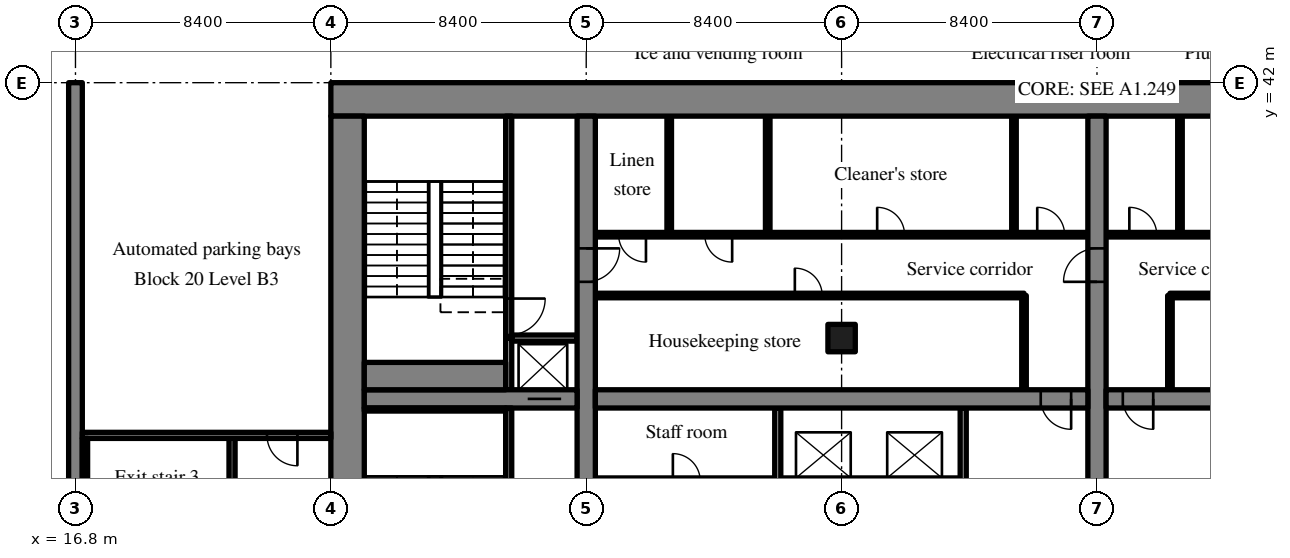
"""IFC4 building model, lengths in metres.
Left out: names, types, materials, properties, quantities, classifications, styles, units other than length and angle.
Written with IfcOpenShell. Run it as: python <this file> out.ifc"""

import sys

from ifc_helpers import new_model, si_unit, direction, frame, frame_2d, origin, origin_2d, place, context, subcontext, project, spatial, rectangle, extrude, source, transform, mapped, element, fill, save


model = new_model("IFC4")
c1 = context("Model", 3, precision=1e-05, world=origin(), true_north=direction((0.0, 1.0)))
c2 = subcontext(c1, "Body", "Model", "MODEL_VIEW")
j1 = project(units=[si_unit("LENGTHUNIT", "METRE"), si_unit("PLANEANGLEUNIT", "RADIAN")], contexts=[c1])
p1 = place(None, origin())
s1 = spatial("IfcSite", under=j1, at=p1, CompositionType="ELEMENT")
p2 = place(p1, origin())
s2 = spatial("IfcBuilding", under=s1, at=p2, CompositionType="ELEMENT")
p3 = place(p2, frame((0.0, 0.0, -13.5)))
s3 = spatial("IfcBuildingStorey", under=s2, at=p3, CompositionType="ELEMENT", Elevation=-13.5)
m1 = source(origin(), c2, "Body", "SweptSolid", [
    extrude(rectangle(XDim=50.4, YDim=1.1, at=frame_2d((25.2, 0.0))), origin(), (0.0, 0.0, 1.0), 4.52),
])
p4 = place(p3, frame((25.2, 41.45, -0.3), z_axis=(0.0, 0.0, 1.0), x_axis=(1.0, 0.0, 0.0)))
e1 = element("IfcWall", 1, at=p4, inside=s3, PredefinedType="SHEAR", context=c2, shape_type="MappedRepresentation", body=[
    mapped(m1, transform((0.0, 0.0, 0.0), scale=1.0)),
])
m2 = source(origin(), c2, "Body", "SweptSolid", [
    extrude(rectangle(XDim=17.8, YDim=1.1, at=frame_2d((8.9, 0.0))), origin(), (0.0, 0.0, 1.0), 4.52),
])
p5 = place(p3, frame((25.75, 23.1, -0.3), z_axis=(0.0, 0.0, 1.0), x_axis=(0.0, 1.0, 0.0)))
e2 = element("IfcWall", 2, at=p5, inside=s3, PredefinedType="SHEAR", context=c2, shape_type="MappedRepresentation", body=[
    mapped(m2, transform((0.0, 0.0, 0.0), scale=1.0)),
])
m3 = source(origin(), c2, "Body", "SweptSolid", [
    extrude(rectangle(XDim=17.8, YDim=0.6, at=frame_2d((8.9, 0.0))), origin(), (0.0, 0.0, 1.0), 4.52),
])
p6 = place(p3, frame((33.6, 23.1, -0.3), z_axis=(0.0, 0.0, 1.0), x_axis=(0.0, 1.0, 0.0)))
e3 = element("IfcWall", 3, at=p6, inside=s3, PredefinedType="SHEAR", context=c2, shape_type="MappedRepresentation", body=[
    mapped(m3, transform((0.0, 0.0, 0.0), scale=1.0)),
])
m4 = source(origin(), c2, "Body", "SweptSolid", [
    extrude(rectangle(XDim=1.1, YDim=2.1, at=frame_2d((0.55, 1.05))), frame((0.0, 0.31, 0.0), z_axis=(0.0, -1.0, 0.0), x_axis=(1.0, 0.0, 0.0)), (0.0, 0.0, 1.0), 0.62),
])
p7 = place(p6, frame((12.35, 0.0, 0.0)))
e4 = element("IfcOpeningElement", 4, at=p7, cuts=e3, PredefinedType="OPENING", context=c2, shape_type="MappedRepresentation", body=[
    mapped(m4, transform((0.0, 0.0, 0.0), scale=1.0)),
])
p8 = place(p3, frame((50.4, 23.1, -0.3), z_axis=(0.0, 0.0, 1.0), x_axis=(0.0, 1.0, 0.0)))
e5 = element("IfcWall", 5, at=p8, inside=s3, PredefinedType="SHEAR", context=c2, shape_type="MappedRepresentation", body=[
    mapped(m3, transform((0.0, 0.0, 0.0), scale=1.0)),
])
p9 = place(p8, frame((12.35, 0.0, 0.0)))
e6 = element("IfcOpeningElement", 6, at=p9, cuts=e5, PredefinedType="OPENING", context=c2, shape_type="MappedRepresentation", body=[
    mapped(m4, transform((0.0, 0.0, 0.0), scale=1.0)),
])
m5 = source(origin(), c2, "Body", "SweptSolid", [
    extrude(rectangle(XDim=7.0, YDim=0.6, at=frame_2d((3.5, 0.0))), origin(), (0.0, 0.0, 1.0), 4.52),
])
p10 = place(p3, frame((26.3, 31.6, -0.3), z_axis=(0.0, 0.0, 1.0), x_axis=(1.0, 0.0, 0.0)))
e7 = element("IfcWall", 7, at=p10, inside=s3, PredefinedType="SHEAR", context=c2, shape_type="MappedRepresentation", body=[
    mapped(m5, transform((0.0, 0.0, 0.0), scale=1.0)),
])
p11 = place(p10, frame((5.375, 0.0, 0.0)))
e8 = element("IfcOpeningElement", 8, at=p11, cuts=e7, PredefinedType="OPENING", context=c2, shape_type="MappedRepresentation", body=[
    mapped(m4, transform((0.0, 0.0, 0.0), scale=1.0)),
])
m6 = source(origin(), c2, "Body", "SweptSolid", [
    extrude(rectangle(XDim=16.2, YDim=0.6, at=frame_2d((8.1, 0.0))), origin(), (0.0, 0.0, 1.0), 4.52),
])
p12 = place(p3, frame((33.9, 31.6, -0.3), z_axis=(0.0, 0.0, 1.0), x_axis=(1.0, 0.0, 0.0)))
e9 = element("IfcWall", 9, at=p12, inside=s3, PredefinedType="SHEAR", context=c2, shape_type="MappedRepresentation", body=[
    mapped(m6, transform((0.0, 0.0, 0.0), scale=1.0)),
])
m7 = source(origin(), c2, "Body", "SweptSolid", [
    extrude(rectangle(XDim=1.0, YDim=2.1, at=frame_2d((0.5, 1.05))), frame((0.0, 0.31, 0.0), z_axis=(0.0, -1.0, 0.0), x_axis=(1.0, 0.0, 0.0)), (0.0, 0.0, 1.0), 0.62),
])
p13 = place(p12, frame((14.65, 0.0, 0.0)))
e10 = element("IfcOpeningElement", 10, at=p13, cuts=e9, PredefinedType="OPENING", context=c2, shape_type="MappedRepresentation", body=[
    mapped(m7, transform((0.0, 0.0, 0.0), scale=1.0)),
])
m8 = source(origin(), c2, "Body", "SweptSolid", [
    extrude(rectangle(XDim=16.2, YDim=0.6, at=frame_2d((8.1, 0.0))), origin(), (0.0, 0.0, 1.0), 4.52),
])
p14 = place(p3, frame((50.7, 31.6, -0.3), z_axis=(0.0, 0.0, 1.0), x_axis=(1.0, 0.0, 0.0)))
e11 = element("IfcWall", 11, at=p14, inside=s3, PredefinedType="SHEAR", context=c2, shape_type="MappedRepresentation", body=[
    mapped(m8, transform((0.0, 0.0, 0.0), scale=1.0)),
])
p15 = place(p14, frame((0.55, 0.0, 0.0)))
e12 = element("IfcOpeningElement", 12, at=p15, cuts=e11, PredefinedType="OPENING", context=c2, shape_type="MappedRepresentation", body=[
    mapped(m7, transform((0.0, 0.0, 0.0), scale=1.0)),
])
m9 = source(origin(), c2, "Body", "SweptSolid", [
    extrude(rectangle(XDim=20.0, YDim=0.45, at=frame_2d((10.0, 0.0))), origin(), (0.0, 0.0, 1.0), 4.52),
])
p16 = place(p3, frame((16.8, 22.0, -0.3), z_axis=(0.0, 0.0, 1.0), x_axis=(0.0, 1.0, 0.0)))
e13 = element("IfcWall", 13, at=p16, inside=s3, PredefinedType="SHEAR", context=c2, shape_type="MappedRepresentation", body=[
    mapped(m9, transform((0.0, 0.0, 0.0), scale=1.0)),
])
m10 = source(origin(), c2, "Body", "SweptSolid", [
    extrude(rectangle(XDim=0.9, YDim=0.9, at=origin_2d()), origin(), (0.0, 0.0, 1.0), 4.52),
])
p17 = place(p3, frame((42.0, 33.6, -0.3), z_axis=(0.0, 0.0, 1.0), x_axis=(1.0, 0.0, 0.0)))
e14 = element("IfcColumn", 14, at=p17, inside=s3, PredefinedType="COLUMN", context=c2, shape_type="MappedRepresentation", body=[
    mapped(m10, transform((0.0, 0.0, 0.0), scale=1.0)),
])
m11 = source(origin(), c2, "Body", "SweptSolid", [
    extrude(rectangle(XDim=2.5, YDim=0.2, at=frame_2d((1.25, 0.0))), origin(), (0.0, 0.0, 1.0), 4.22),
])
p18 = place(p3, frame((46.0, 28.8, 0.0), z_axis=(0.0, 0.0, 1.0), x_axis=(0.0, 1.0, 0.0)))
e15 = element("IfcWall", 15, at=p18, inside=s3, PredefinedType="SOLIDWALL", context=c2, shape_type="MappedRepresentation", body=[
    mapped(m11, transform((0.0, 0.0, 0.0), scale=1.0)),
])
m12 = source(origin(), c2, "Body", "SweptSolid", [
    extrude(rectangle(XDim=2.4, YDim=0.2, at=frame_2d((1.2, 0.0))), origin(), (0.0, 0.0, 1.0), 4.22),
])
p19 = place(p3, frame((39.9, 28.9, 0.0), z_axis=(0.0, 0.0, 1.0), x_axis=(0.0, 1.0, 0.0)))
e16 = element("IfcWall", 16, at=p19, inside=s3, PredefinedType="PARTITIONING", context=c2, shape_type="MappedRepresentation", body=[
    mapped(m12, transform((0.0, 0.0, 0.0), scale=1.0)),
])
m13 = source(origin(), c2, "Body", "SweptSolid", [
    extrude(rectangle(XDim=3.1, YDim=0.15, at=frame_2d((1.55, 0.0))), origin(), (0.0, 0.0, 1.0), 4.22),
])
p20 = place(p3, frame((48.0, 31.9, 0.0), z_axis=(0.0, 0.0, 1.0), x_axis=(0.0, 1.0, 0.0)))
e17 = element("IfcWall", 17, at=p20, inside=s3, PredefinedType="PARTITIONING", context=c2, shape_type="MappedRepresentation", body=[
    mapped(m13, transform((0.0, 0.0, 0.0), scale=1.0)),
])
m14 = source(origin(), c2, "Body", "SweptSolid", [
    extrude(rectangle(XDim=14.1, YDim=0.15, at=frame_2d((7.05, 0.0))), origin(), (0.0, 0.0, 1.0), 4.22),
])
p21 = place(p3, frame((33.9, 35.0, 0.0), z_axis=(0.0, 0.0, 1.0), x_axis=(1.0, 0.0, 0.0)))
e18 = element("IfcWall", 18, at=p21, inside=s3, PredefinedType="PARTITIONING", context=c2, shape_type="MappedRepresentation", body=[
    mapped(m14, transform((0.0, 0.0, 0.0), scale=1.0)),
])
m15 = source(origin(), c2, "Body", "SweptSolid", [
    extrude(rectangle(XDim=0.9, YDim=2.1, at=frame_2d((0.45, 1.05))), frame((0.0, 0.085, 0.0), z_axis=(0.0, -1.0, 0.0), x_axis=(1.0, 0.0, 0.0)), (0.0, 0.0, 1.0), 0.17),
])
p22 = place(p21, frame((6.562, 0.0, 0.0)))
e19 = element("IfcOpeningElement", 19, at=p22, cuts=e18, PredefinedType="OPENING", context=c2, shape_type="MappedRepresentation", body=[
    mapped(m15, transform((0.0, 0.0, 0.0), scale=1.0)),
])
m16 = source(origin(), c2, "Body", "SweptSolid", [
    extrude(rectangle(XDim=16.2, YDim=0.15, at=frame_2d((8.1, 0.0))), origin(), (0.0, 0.0, 1.0), 4.22),
])
p23 = place(p3, frame((33.9, 37.0, 0.0), z_axis=(0.0, 0.0, 1.0), x_axis=(1.0, 0.0, 0.0)))
e20 = element("IfcWall", 20, at=p23, inside=s3, PredefinedType="PARTITIONING", context=c2, shape_type="MappedRepresentation", body=[
    mapped(m16, transform((0.0, 0.0, 0.0), scale=1.0)),
])
p24 = place(p23, frame((0.765, 0.0, 0.0)))
e21 = element("IfcOpeningElement", 21, at=p24, cuts=e20, PredefinedType="OPENING", context=c2, shape_type="MappedRepresentation", body=[
    mapped(m15, transform((0.0, 0.0, 0.0), scale=1.0)),
])
p25 = place(p23, frame((3.6, 0.0, 0.0)))
e22 = element("IfcOpeningElement", 22, at=p25, cuts=e20, PredefinedType="OPENING", context=c2, shape_type="MappedRepresentation", body=[
    mapped(m15, transform((0.0, 0.0, 0.0), scale=1.0)),
])
p26 = place(p23, frame((9.27, 0.0, 0.0)))
e23 = element("IfcOpeningElement", 23, at=p26, cuts=e20, PredefinedType="OPENING", context=c2, shape_type="MappedRepresentation", body=[
    mapped(m15, transform((0.0, 0.0, 0.0), scale=1.0)),
])
p27 = place(p23, frame((14.535, 0.0, 0.0)))
e24 = element("IfcOpeningElement", 24, at=p27, cuts=e20, PredefinedType="OPENING", context=c2, shape_type="MappedRepresentation", body=[
    mapped(m15, transform((0.0, 0.0, 0.0), scale=1.0)),
])
m17 = source(origin(), c2, "Body", "SweptSolid", [
    extrude(rectangle(XDim=3.9, YDim=0.15, at=frame_2d((1.95, 0.0))), origin(), (0.0, 0.0, 1.0), 4.22),
])
for number, where, z_axis, x_axis in (
    (25, (36.33, 37.0, 0.0), (0.0, 0.0, 1.0), (0.0, 1.0, 0.0)),
    (26, (39.57, 37.0, 0.0), (0.0, 0.0, 1.0), (0.0, 1.0, 0.0)),
    (27, (47.67, 37.0, 0.0), (0.0, 0.0, 1.0), (0.0, 1.0, 0.0)),
):
    element("IfcWall", number, at=place(p3, frame(where, z_axis=z_axis, x_axis=x_axis)), inside=s3, PredefinedType="PARTITIONING", context=c2, shape_type="MappedRepresentation", body=[
        mapped(m17, transform((0.0, 0.0, 0.0), scale=1.0)),
    ])
p28 = place(p3, frame((52.8, 31.9, 0.0), z_axis=(0.0, 0.0, 1.0), x_axis=(0.0, 1.0, 0.0)))
e28 = element("IfcWall", 28, at=p28, inside=s3, PredefinedType="PARTITIONING", context=c2, shape_type="MappedRepresentation", body=[
    mapped(m13, transform((0.0, 0.0, 0.0), scale=1.0)),
])
m18 = source(origin(), c2, "Body", "SweptSolid", [
    extrude(rectangle(XDim=14.1, YDim=0.15, at=frame_2d((7.05, 0.0))), origin(), (0.0, 0.0, 1.0), 4.22),
])
p29 = place(p3, frame((66.9, 35.0, 0.0), z_axis=(0.0, 0.0, 1.0), x_axis=(-1.0, 0.0, 0.0)))
e29 = element("IfcWall", 29, at=p29, inside=s3, PredefinedType="PARTITIONING", context=c2, shape_type="MappedRepresentation", body=[
    mapped(m18, transform((0.0, 0.0, 0.0), scale=1.0)),
])
p30 = place(p29, frame((3.407, 0.0, 0.0)))
e30 = element("IfcOpeningElement", 30, at=p30, cuts=e29, PredefinedType="OPENING", context=c2, shape_type="MappedRepresentation", body=[
    mapped(m15, transform((0.0, 0.0, 0.0), scale=1.0)),
])
p31 = place(p29, frame((10.419, 0.0, 0.0)))
e31 = element("IfcOpeningElement", 31, at=p31, cuts=e29, PredefinedType="OPENING", context=c2, shape_type="MappedRepresentation", body=[
    mapped(m15, transform((0.0, 0.0, 0.0), scale=1.0)),
])
m19 = source(origin(), c2, "Body", "SweptSolid", [
    extrude(rectangle(XDim=16.2, YDim=0.15, at=frame_2d((8.1, 0.0))), origin(), (0.0, 0.0, 1.0), 4.22),
])
p32 = place(p3, frame((66.9, 37.0, 0.0), z_axis=(0.0, 0.0, 1.0), x_axis=(-1.0, 0.0, 0.0)))
e32 = element("IfcWall", 32, at=p32, inside=s3, PredefinedType="PARTITIONING", context=c2, shape_type="MappedRepresentation", body=[
    mapped(m19, transform((0.0, 0.0, 0.0), scale=1.0)),
])
p33 = place(p32, frame((6.435, 0.0, 0.0)))
e33 = element("IfcOpeningElement", 33, at=p33, cuts=e32, PredefinedType="OPENING", context=c2, shape_type="MappedRepresentation", body=[
    mapped(m15, transform((0.0, 0.0, 0.0), scale=1.0)),
])
p34 = place(p32, frame((14.535, 0.0, 0.0)))
e34 = element("IfcOpeningElement", 34, at=p34, cuts=e32, PredefinedType="OPENING", context=c2, shape_type="MappedRepresentation", body=[
    mapped(m15, transform((0.0, 0.0, 0.0), scale=1.0)),
])
p35 = place(p3, frame((53.13, 37.0, 0.0), z_axis=(0.0, 0.0, 1.0), x_axis=(0.0, 1.0, 0.0)))
e35 = element("IfcWall", 35, at=p35, inside=s3, PredefinedType="PARTITIONING", context=c2, shape_type="MappedRepresentation", body=[
    mapped(m17, transform((0.0, 0.0, 0.0), scale=1.0)),
])
m20 = source(origin(), c2, "Body", "SweptSolid", [
    extrude(rectangle(XDim=8.2, YDim=0.2, at=frame_2d((4.1, 0.0))), origin(), (0.0, 0.0, 1.0), 4.52),
])
p36 = place(p3, frame((31.05, 23.1, -0.3), z_axis=(0.0, 0.0, 1.0), x_axis=(0.0, 1.0, 0.0)))
e36 = element("IfcWall", 36, at=p36, inside=s3, PredefinedType="SOLIDWALL", context=c2, shape_type="MappedRepresentation", body=[
    mapped(m20, transform((0.0, 0.0, 0.0), scale=1.0)),
])
m21 = source(origin(), c2, "Body", "SweptSolid", [
    extrude(rectangle(XDim=1.2, YDim=2.1, at=frame_2d((0.6, 1.05))), frame((0.0, 0.11, 0.0), z_axis=(0.0, -1.0, 0.0), x_axis=(1.0, 0.0, 0.0)), (0.0, 0.0, 1.0), 0.22),
])
p37 = place(p36, frame((0.5, 0.0, 0.0)))
e37 = element("IfcOpeningElement", 37, at=p37, cuts=e36, PredefinedType="OPENING", context=c2, shape_type="MappedRepresentation", body=[
    mapped(m21, transform((0.0, 0.0, 0.0), scale=1.0)),
])
m22 = source(origin(), c2, "Body", "SweptSolid", [
    extrude(rectangle(XDim=1.7, YDim=0.2, at=frame_2d((0.85, 0.0))), origin(), (0.0, 0.0, 1.0), 4.22),
])
p38 = place(p3, frame((31.05, 31.9, 0.0), z_axis=(0.0, 0.0, 1.0), x_axis=(0.0, 1.0, 0.0)))
e38 = element("IfcWall", 38, at=p38, inside=s3, PredefinedType="SOLIDWALL", context=c2, shape_type="MappedRepresentation", body=[
    mapped(m22, transform((0.0, 0.0, 0.0), scale=1.0)),
])
m23 = source(origin(), c2, "Body", "SweptSolid", [
    extrude(rectangle(XDim=2.15, YDim=0.2, at=frame_2d((1.075, 0.0))), origin(), (0.0, 0.0, 1.0), 4.22),
])
p39 = place(p3, frame((31.15, 33.6, 0.0), z_axis=(0.0, 0.0, 1.0), x_axis=(1.0, 0.0, 0.0)))
e39 = element("IfcWall", 39, at=p39, inside=s3, PredefinedType="SOLIDWALL", context=c2, shape_type="MappedRepresentation", body=[
    mapped(m23, transform((0.0, 0.0, 0.0), scale=1.0)),
])
m24 = source(origin(), c2, "Body", "SweptSolid", [
    extrude(rectangle(XDim=7.3, YDim=0.2, at=frame_2d((3.65, 0.0))), origin(), (0.0, 0.0, 1.0), 4.52),
])
p40 = place(p3, frame((31.05, 33.6, -0.3), z_axis=(0.0, 0.0, 1.0), x_axis=(0.0, 1.0, 0.0)))
e40 = element("IfcWall", 40, at=p40, inside=s3, PredefinedType="SOLIDWALL", context=c2, shape_type="MappedRepresentation", body=[
    mapped(m24, transform((0.0, 0.0, 0.0), scale=1.0)),
])
p41 = place(p40, frame((0.1, 0.0, 0.0)))
e41 = element("IfcOpeningElement", 41, at=p41, cuts=e40, PredefinedType="OPENING", context=c2, shape_type="MappedRepresentation", body=[
    mapped(m21, transform((0.0, 0.0, 0.0), scale=1.0)),
])
m25 = source(origin(), c2, "Body", "SweptSolid", [
    extrude(rectangle(XDim=8.3, YDim=0.2, at=frame_2d((4.15, 0.0))), origin(), (0.0, 0.0, 1.0), 4.52),
])
p42 = place(p3, frame((21.95, 22.1, -0.3), z_axis=(0.0, 0.0, 1.0), x_axis=(0.0, 1.0, 0.0)))
e42 = element("IfcWall", 42, at=p42, inside=s3, PredefinedType="SOLIDWALL", context=c2, shape_type="MappedRepresentation", body=[
    mapped(m25, transform((0.0, 0.0, 0.0), scale=1.0)),
])
p43 = place(p42, frame((0.6, 0.0, 0.0)))
e43 = element("IfcOpeningElement", 43, at=p43, cuts=e42, PredefinedType="OPENING", context=c2, shape_type="MappedRepresentation", body=[
    mapped(m21, transform((0.0, 0.0, 0.0), scale=1.0)),
])
m26 = source(origin(), c2, "Body", "SweptSolid", [
    extrude(rectangle(XDim=8.175, YDim=0.2, at=frame_2d((4.087, 0.0))), origin(), (0.0, 0.0, 1.0), 4.52),
])
p44 = place(p3, frame((17.025, 30.4, -0.3), z_axis=(0.0, 0.0, 1.0), x_axis=(1.0, 0.0, 0.0)))
e44 = element("IfcWall", 44, at=p44, inside=s3, PredefinedType="SOLIDWALL", context=c2, shape_type="MappedRepresentation", body=[
    mapped(m26, transform((0.0, 0.0, 0.0), scale=1.0)),
])
m27 = source(origin(), c2, "Body", "SweptSolid", [
    extrude(rectangle(XDim=1.0, YDim=2.1, at=frame_2d((0.5, 1.05))), frame((0.0, 0.11, 0.0), z_axis=(0.0, -1.0, 0.0), x_axis=(1.0, 0.0, 0.0)), (0.0, 0.0, 1.0), 0.22),
])
p45 = place(p44, frame((6.075, 0.0, 0.0)))
e45 = element("IfcOpeningElement", 45, at=p45, cuts=e44, PredefinedType="OPENING", context=c2, shape_type="MappedRepresentation", body=[
    mapped(m27, transform((0.0, 0.0, 0.0), scale=1.0)),
])
m28 = source(origin(), c2, "Body", "SweptSolid", [
    extrude(rectangle(XDim=4.65, YDim=0.1, at=frame_2d((2.325, 0.0))), origin(), (0.0, 0.0, 1.0), 4.52),
])
p46 = place(p3, frame((26.3, 31.25, -0.3), z_axis=(0.0, 0.0, 1.0), x_axis=(1.0, 0.0, 0.0)))
e46 = element("IfcWall", 46, at=p46, inside=s3, PredefinedType="SOLIDWALL", context=c2, shape_type="MappedRepresentation", body=[
    mapped(m28, transform((0.0, 0.0, 0.0), scale=1.0)),
])
m29 = source(origin(), c2, "Body", "SweptSolid", [
    extrude(rectangle(XDim=8.1, YDim=0.175, at=frame_2d((4.05, 0.0))), origin(), (0.0, 0.0, 1.0), 4.52),
])
p47 = place(p3, frame((17.112, 22.2, -0.3), z_axis=(0.0, 0.0, 1.0), x_axis=(0.0, 1.0, 0.0)))
e47 = element("IfcWall", 47, at=p47, inside=s3, PredefinedType="SOLIDWALL", context=c2, shape_type="MappedRepresentation", body=[
    mapped(m29, transform((0.0, 0.0, 0.0), scale=1.0)),
])
m30 = source(origin(), c2, "Body", "SweptSolid", [
    extrude(rectangle(XDim=4.65, YDim=0.9, at=frame_2d((2.325, 0.0))), origin(), (0.0, 0.0, 1.0), 4.52),
])
p48 = place(p3, frame((26.3, 32.35, -0.3), z_axis=(0.0, 0.0, 1.0), x_axis=(1.0, 0.0, 0.0)))
e48 = element("IfcWall", 48, at=p48, inside=s3, PredefinedType="SOLIDWALL", context=c2, shape_type="MappedRepresentation", body=[
    mapped(m30, transform((0.0, 0.0, 0.0), scale=1.0)),
])
m31 = source(origin(), c2, "Body", "SweptSolid", [
    extrude(rectangle(XDim=1.0, YDim=2.1, at=frame_2d((0.5, 1.05))), frame((0.0, 0.025, 0.0), z_axis=(0.0, -1.0, 0.0), x_axis=(1.0, 0.0, 0.0)), (0.0, 0.0, 1.0), 0.05),
])
p49 = place(p13, origin())
e49 = element("IfcDoor", 49, at=p49, inside=s3, OperationType="SINGLE_SWING_RIGHT", PredefinedType="DOOR", context=c2, shape_type="MappedRepresentation", body=[
    mapped(m31, transform((0.0, 0.0, 0.0), scale=1.0)),
])
fill(e10, e49)
m32 = source(origin(), c2, "Body", "SweptSolid", [
    extrude(rectangle(XDim=0.9, YDim=2.1, at=frame_2d((0.45, 1.05))), frame((0.0, 0.025, 0.0), z_axis=(0.0, -1.0, 0.0), x_axis=(1.0, 0.0, 0.0)), (0.0, 0.0, 1.0), 0.05),
])
p50 = place(p22, origin())
e50 = element("IfcDoor", 50, at=p50, inside=s3, OperationType="SINGLE_SWING_LEFT", PredefinedType="DOOR", context=c2, shape_type="MappedRepresentation", body=[
    mapped(m32, transform((0.0, 0.0, 0.0), scale=1.0)),
])
fill(e19, e50)
p51 = place(p24, origin())
e51 = element("IfcDoor", 51, at=p51, inside=s3, OperationType="SINGLE_SWING_RIGHT", PredefinedType="DOOR", context=c2, shape_type="MappedRepresentation", body=[
    mapped(m32, transform((0.0, 0.0, 0.0), scale=1.0)),
])
fill(e21, e51)
p52 = place(p25, origin())
e52 = element("IfcDoor", 52, at=p52, inside=s3, OperationType="SINGLE_SWING_RIGHT", PredefinedType="DOOR", context=c2, shape_type="MappedRepresentation", body=[
    mapped(m32, transform((0.0, 0.0, 0.0), scale=1.0)),
])
fill(e22, e52)
p53 = place(p26, origin())
e53 = element("IfcDoor", 53, at=p53, inside=s3, OperationType="SINGLE_SWING_LEFT", PredefinedType="DOOR", context=c2, shape_type="MappedRepresentation", body=[
    mapped(m32, transform((0.0, 0.0, 0.0), scale=1.0)),
])
fill(e23, e53)
p54 = place(p27, origin())
e54 = element("IfcDoor", 54, at=p54, inside=s3, OperationType="SINGLE_SWING_LEFT", PredefinedType="DOOR", context=c2, shape_type="MappedRepresentation", body=[
    mapped(m32, transform((0.0, 0.0, 0.0), scale=1.0)),
])
fill(e24, e54)
p55 = place(p15, origin())
e55 = element("IfcDoor", 55, at=p55, inside=s3, OperationType="SINGLE_SWING_RIGHT", PredefinedType="DOOR", context=c2, shape_type="MappedRepresentation", body=[
    mapped(m31, transform((0.0, 0.0, 0.0), scale=1.0)),
])
fill(e12, e55)
p56 = place(p34, origin())
e56 = element("IfcDoor", 56, at=p56, inside=s3, OperationType="SINGLE_SWING_RIGHT", PredefinedType="DOOR", context=c2, shape_type="MappedRepresentation", body=[
    mapped(m32, transform((0.0, 0.0, 0.0), scale=1.0)),
])
fill(e34, e56)
m33 = source(origin(), c2, "Body", "SweptSolid", [
    extrude(rectangle(XDim=1.1, YDim=2.1, at=frame_2d((0.55, 1.05))), frame((0.0, 0.025, 0.0), z_axis=(0.0, -1.0, 0.0), x_axis=(1.0, 0.0, 0.0)), (0.0, 0.0, 1.0), 0.05),
])
p57 = place(p11, origin())
e57 = element("IfcDoor", 57, at=p57, inside=s3, OperationType="SLIDING_TO_RIGHT", PredefinedType="DOOR", context=c2, shape_type="MappedRepresentation", body=[
    mapped(m33, transform((0.0, 0.0, 0.0), scale=1.0)),
])
fill(e8, e57)
m34 = source(origin(), c2, "Body", "SweptSolid", [
    extrude(rectangle(XDim=1.2, YDim=2.1, at=frame_2d((0.6, 1.05))), frame((0.0, 0.025, 0.0), z_axis=(0.0, -1.0, 0.0), x_axis=(1.0, 0.0, 0.0)), (0.0, 0.0, 1.0), 0.05),
])
p58 = place(p41, origin())
e58 = element("IfcDoor", 58, at=p58, inside=s3, OperationType="SINGLE_SWING_RIGHT", PredefinedType="DOOR", context=c2, shape_type="MappedRepresentation", body=[
    mapped(m34, transform((0.0, 0.0, 0.0), scale=1.0)),
])
fill(e41, e58)
p59 = place(p45, origin())
e59 = element("IfcDoor", 59, at=p59, inside=s3, OperationType="SINGLE_SWING_RIGHT", PredefinedType="DOOR", context=c2, shape_type="MappedRepresentation", body=[
    mapped(m31, transform((0.0, 0.0, 0.0), scale=1.0)),
])
fill(e45, e59)
p60 = place(p7, origin())
e60 = element("IfcDoor", 60, at=p60, inside=s3, OperationType="SINGLE_SWING_RIGHT", PredefinedType="DOOR", context=c2, shape_type="MappedRepresentation", body=[
    mapped(m33, transform((0.0, 0.0, 0.0), scale=1.0)),
])
fill(e4, e60)
p61 = place(p9, origin())
e61 = element("IfcDoor", 61, at=p61, inside=s3, OperationType="SINGLE_SWING_LEFT", PredefinedType="DOOR", context=c2, shape_type="MappedRepresentation", body=[
    mapped(m33, transform((0.0, 0.0, 0.0), scale=1.0)),
])
fill(e6, e61)
save(model, sys.argv[1])
